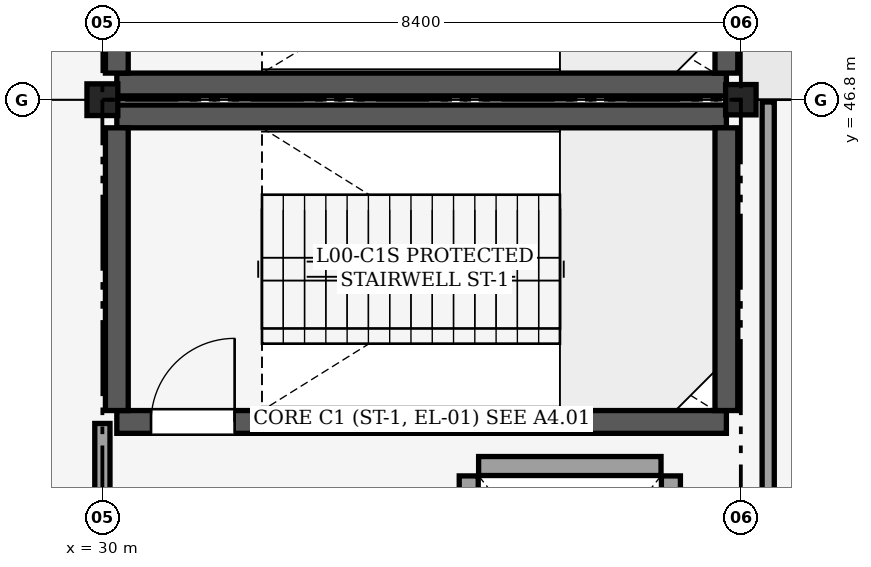
"""IFC4 building model, lengths in metres.
Left out: names, types, materials, properties, quantities, classifications, styles, units other than length and angle.
Written with IfcOpenShell. Run it as: python <this file> out.ifc"""

import sys

from ifc_helpers import new_model, si_unit, direction, frame, frame_2d, origin, origin_2d, place, context, subcontext, project, spatial, rectangle, i_section, extrude, element, fill, save


model = new_model("IFC4")
c1 = context("Model", 3, precision=1e-05, world=origin(), true_north=direction((0.0, 1.0)))
c2 = subcontext(c1, "Body", "Model", "MODEL_VIEW")
j1 = project(units=[si_unit("LENGTHUNIT", "METRE"), si_unit("PLANEANGLEUNIT", "RADIAN")], contexts=[c1])
p1 = place(None, origin())
s1 = spatial("IfcSite", under=j1, at=p1, CompositionType="ELEMENT")
p2 = place(p1, origin())
s2 = spatial("IfcBuilding", under=s1, at=p2, CompositionType="ELEMENT")
p3 = place(p2, origin())
s3 = spatial("IfcBuildingStorey", under=s2, at=p3, CompositionType="ELEMENT", Elevation=0.0)
p4 = place(p3, frame((30.0, 46.8, 0.0), z_axis=(0.0, 0.0, 1.0), x_axis=(1.0, 0.0, 0.0)))
e1 = element("IfcColumn", 1, at=p4, inside=s3, PredefinedType="COLUMN", context=c2, shape_type="SweptSolid", body=[
    extrude(i_section(OverallWidth=0.406, OverallDepth=0.417, WebThickness=0.03, FlangeThickness=0.048, FilletRadius=0.025, at=origin_2d()), origin(), (0.0, 0.0, 1.0), 5.4),
])
p5 = place(p3, frame((38.4, 46.8, 0.0), z_axis=(0.0, 0.0, 1.0), x_axis=(1.0, 0.0, 0.0)))
e2 = element("IfcColumn", 2, at=p5, inside=s3, PredefinedType="COLUMN", context=c2, shape_type="SweptSolid", body=[
    extrude(i_section(OverallWidth=0.401, OverallDepth=0.399, WebThickness=0.025, FlangeThickness=0.04, FilletRadius=0.025, at=origin_2d()), origin(), (0.0, 0.0, 1.0), 5.4),
])
p6 = place(p3, frame((30.19, 42.56, 0.0), z_axis=(0.0, 0.0, 1.0), x_axis=(1.0, 0.0, 0.0)))
e3 = element("IfcWall", 3, at=p6, inside=s3, PredefinedType="SHEAR", context=c2, shape_type="SweptSolid", body=[
    extrude(rectangle(XDim=8.02, YDim=0.3, at=frame_2d((4.01, 0.0))), origin(), (0.0, 0.0, 1.0), 5.16),
])
p7 = place(p6, frame((0.45, 0.0, 0.0)))
e4 = element("IfcOpeningElement", 4, at=p7, cuts=e3, PredefinedType="OPENING", context=c2, shape_type="SweptSolid", body=[
    extrude(rectangle(XDim=1.1, YDim=2.15, at=frame_2d((0.55, 1.075))), frame((0.0, 0.16, 0.0), z_axis=(0.0, -1.0, 0.0), x_axis=(1.0, 0.0, 0.0)), (0.0, 0.0, 1.0), 0.321),
])
p8 = place(p3, frame((30.19, 46.58, 0.0), z_axis=(0.0, 0.0, 1.0), x_axis=(1.0, 0.0, 0.0)))
e5 = element("IfcWall", 5, at=p8, inside=s3, PredefinedType="SHEAR", context=c2, shape_type="SweptSolid", body=[
    extrude(rectangle(XDim=8.02, YDim=0.3, at=frame_2d((4.01, 0.0))), origin(), (0.0, 0.0, 1.0), 5.16),
])
for number, where, z_axis, x_axis in (
    (6, (30.19, 42.71, 0.0), (0.0, 0.0, 1.0), (0.0, 1.0, 0.0)),
    (7, (38.21, 42.71, 0.0), (0.0, 0.0, 1.0), (0.0, 1.0, 0.0)),
):
    element("IfcWall", number, at=place(p3, frame(where, z_axis=z_axis, x_axis=x_axis)), inside=s3, PredefinedType="SHEAR", context=c2, shape_type="SweptSolid", body=[
        extrude(rectangle(XDim=3.72, YDim=0.3, at=frame_2d((1.86, 0.0))), origin(), (0.0, 0.0, 1.0), 5.16),
    ])
p9 = place(p3, frame((37.48, 38.85, 0.0), z_axis=(0.0, 0.0, 1.0), x_axis=(0.0, 1.0, 0.0)))
e8 = element("IfcWall", 8, at=p9, inside=s3, PredefinedType="PARTITIONING", context=c2, shape_type="SweptSolid", body=[
    extrude(rectangle(XDim=3.0, YDim=0.25, at=frame_2d((1.5, 0.0))), origin(), (0.0, 0.0, 1.0), 5.16),
])
p10 = place(p3, frame((34.95, 41.98, 0.0), z_axis=(0.0, 0.0, 1.0), x_axis=(1.0, 0.0, 0.0)))
e9 = element("IfcWall", 9, at=p10, inside=s3, PredefinedType="PARTITIONING", context=c2, shape_type="SweptSolid", body=[
    extrude(rectangle(XDim=2.4, YDim=0.25, at=frame_2d((1.2, 0.0))), origin(), (0.0, 0.0, 1.0), 5.16),
])
p11 = place(p3, frame((34.82, 38.5, 0.0), z_axis=(0.0, 0.0, 1.0), x_axis=(0.0, 1.0, 0.0)))
e10 = element("IfcWall", 10, at=p11, inside=s3, PredefinedType="PARTITIONING", context=c2, shape_type="SweptSolid", body=[
    extrude(rectangle(XDim=3.35, YDim=0.25, at=frame_2d((1.675, 0.0))), origin(), (0.0, 0.0, 1.0), 5.16),
])
p12 = place(p11, frame((0.85, 0.0, 0.0)))
e11 = element("IfcOpeningElement", 11, at=p12, cuts=e10, PredefinedType="OPENING", context=c2, shape_type="SweptSolid", body=[
    extrude(rectangle(XDim=1.25, YDim=2.15, at=frame_2d((0.625, 1.075))), frame((0.0, 0.135, 0.0), z_axis=(0.0, -1.0, 0.0), x_axis=(1.0, 0.0, 0.0)), (0.0, 0.0, 1.0), 0.271),
])
p13 = place(p3, frame((30.0, 38.62, 0.0), z_axis=(0.0, 0.0, 1.0), x_axis=(0.0, 1.0, 0.0)))
e12 = element("IfcWall", 12, at=p13, inside=s3, PredefinedType="PARTITIONING", context=c2, shape_type="SweptSolid", body=[
    extrude(rectangle(XDim=3.92, YDim=0.2, at=frame_2d((1.96, 0.0))), origin(), (0.0, 0.0, 1.0), 4.447),
])
p14 = place(p3, frame((30.19, 47.0, 0.0), z_axis=(0.0, 0.0, 1.0), x_axis=(1.0, 0.0, 0.0)))
e13 = element("IfcWall", 13, at=p14, inside=s3, PredefinedType="SHEAR", context=c2, shape_type="SweptSolid", body=[
    extrude(rectangle(XDim=8.02, YDim=0.3, at=frame_2d((4.01, 0.0))), origin(), (0.0, 0.0, 1.0), 5.16),
])
for number, where, z_axis, x_axis in (
    (14, (30.19, 47.15, 0.0), (0.0, 0.0, 1.0), (0.0, 1.0, 0.0)),
    (15, (38.21, 47.15, 0.0), (0.0, 0.0, 1.0), (0.0, 1.0, 0.0)),
):
    element("IfcWall", number, at=place(p3, frame(where, z_axis=z_axis, x_axis=x_axis)), inside=s3, PredefinedType="SHEAR", context=c2, shape_type="SweptSolid", body=[
        extrude(rectangle(XDim=3.6, YDim=0.3, at=frame_2d((1.8, 0.0))), origin(), (0.0, 0.0, 1.0), 5.16),
    ])
p15 = place(p3, frame((38.76, 38.41, 0.0), z_axis=(0.0, 0.0, 1.0), x_axis=(0.0, 1.0, 0.0)))
e16 = element("IfcWall", 16, at=p15, inside=s3, PredefinedType="PARTITIONING", context=c2, shape_type="SweptSolid", body=[
    extrude(rectangle(XDim=8.36, YDim=0.16, at=frame_2d((4.18, 0.0))), origin(), (0.0, 0.0, 1.0), 5.14),
])
p16 = place(p7, origin())
e17 = element("IfcDoor", 17, at=p16, inside=s3, OperationType="SINGLE_SWING_RIGHT", PredefinedType="DOOR", context=c2, shape_type="SweptSolid", body=[
    extrude(rectangle(XDim=1.1, YDim=2.15, at=frame_2d((0.55, 1.075))), frame((0.0, 0.025, 0.0), z_axis=(0.0, -1.0, 0.0), x_axis=(1.0, 0.0, 0.0)), (0.0, 0.0, 1.0), 0.05),
])
fill(e4, e17)
save(model, sys.argv[1])
